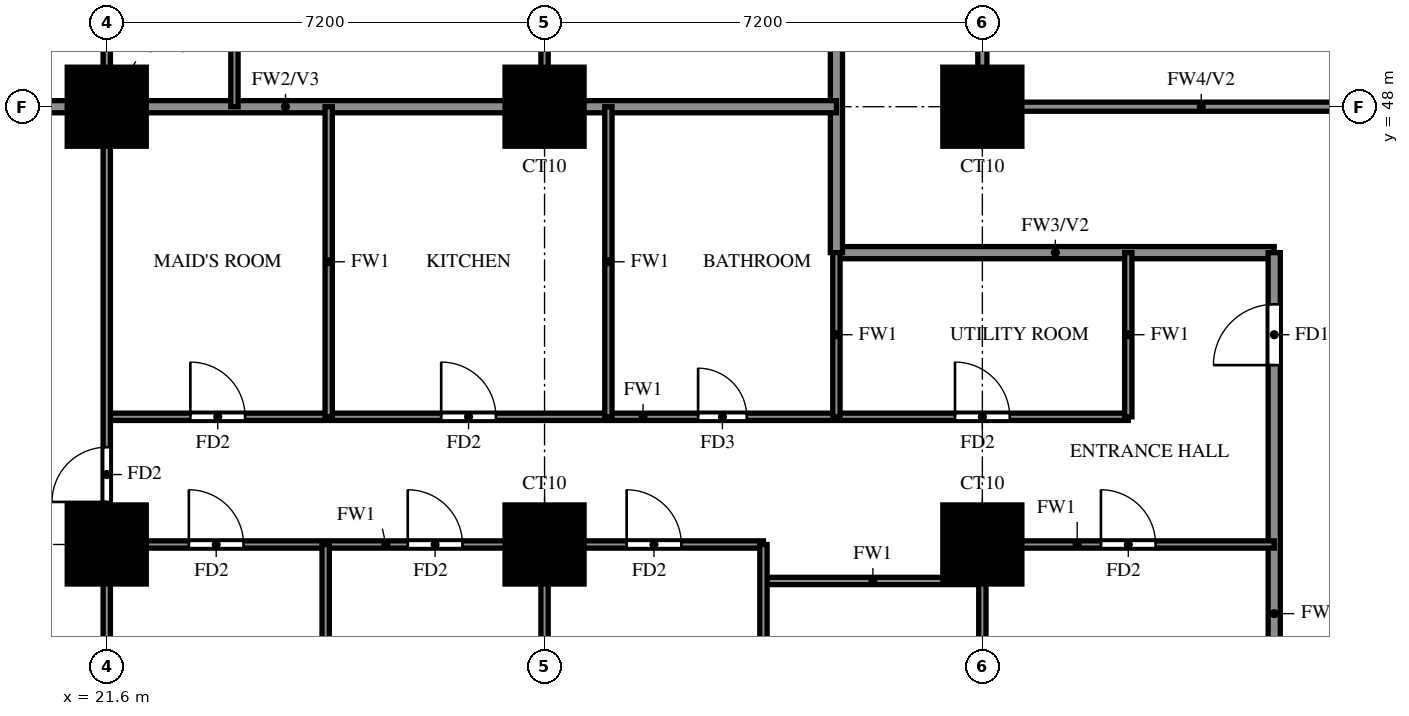
"""IFC4 building model, lengths in metres.
Left out: names, types, materials, properties, quantities, classifications, styles, units other than length and angle.
Written with IfcOpenShell. Run it as: python <this file> out.ifc"""

import sys

from ifc_helpers import new_model, si_unit, direction, frame, frame_2d, origin, origin_2d, place, context, subcontext, project, spatial, rectangle, extrude, source, transform, mapped, element, fill, save


model = new_model("IFC4")
c1 = context("Model", 3, precision=1e-05, world=origin(), true_north=direction((0.0, 1.0)))
c2 = subcontext(c1, "Body", "Model", "MODEL_VIEW")
j1 = project(units=[si_unit("LENGTHUNIT", "METRE"), si_unit("PLANEANGLEUNIT", "RADIAN")], contexts=[c1])
p1 = place(None, origin())
s1 = spatial("IfcSite", under=j1, at=p1, CompositionType="ELEMENT")
p2 = place(p1, origin())
s2 = spatial("IfcBuilding", under=s1, at=p2, CompositionType="ELEMENT")
p3 = place(p2, frame((0.0, 0.0, 62.0)))
s3 = spatial("IfcBuildingStorey", under=s2, at=p3, CompositionType="ELEMENT", Elevation=62.0)
m1 = source(origin(), c2, "Body", "SweptSolid", [
    extrude(rectangle(XDim=1.3, YDim=1.3, at=origin_2d()), origin(), (0.0, 0.0, 1.0), 3.18),
])
for number, where, z_axis, x_axis in (
    (1, (21.6, 40.8, 0.0), (0.0, 0.0, 1.0), (1.0, 0.0, 0.0)),
    (2, (28.8, 40.8, 0.0), (0.0, 0.0, 1.0), (1.0, 0.0, 0.0)),
    (3, (36.0, 40.8, 0.0), (0.0, 0.0, 1.0), (1.0, 0.0, 0.0)),
    (4, (21.6, 48.0, 0.0), (0.0, 0.0, 1.0), (1.0, 0.0, 0.0)),
    (5, (28.8, 48.0, 0.0), (0.0, 0.0, 1.0), (1.0, 0.0, 0.0)),
    (6, (36.0, 48.0, 0.0), (0.0, 0.0, 1.0), (1.0, 0.0, 0.0)),
):
    element("IfcColumn", number, at=place(p3, frame(where, z_axis=z_axis, x_axis=x_axis)), inside=s3, PredefinedType="COLUMN", context=c2, shape_type="MappedRepresentation", body=[
        mapped(m1, transform((0.0, 0.0, 0.0))),
    ])
p4 = place(p3, frame((33.6, 45.6, 0.0), z_axis=(0.0, 0.0, 1.0), x_axis=(1.0, 0.0, 0.0)))
e7 = element("IfcWall", 7, at=p4, inside=s3, PredefinedType="SOLIDWALL", context=c2, shape_type="SweptSolid", body=[
    extrude(rectangle(XDim=7.2, YDim=0.2, at=frame_2d((3.6, 0.0))), origin(), (0.0, 0.0, 1.0), 3.18),
])
p5 = place(p3, frame((33.6, 45.6, 0.0), z_axis=(0.0, 0.0, 1.0), x_axis=(0.0, 1.0, 0.0)))
e8 = element("IfcWall", 8, at=p5, inside=s3, PredefinedType="SOLIDWALL", context=c2, shape_type="SweptSolid", body=[
    extrude(rectangle(XDim=12.0, YDim=0.2, at=frame_2d((6.0, 0.0))), origin(), (0.0, 0.0, 1.0), 3.18),
])
p6 = place(p3, frame((40.8, 33.725, 0.0), z_axis=(0.0, 0.0, 1.0), x_axis=(0.0, 1.0, 0.0)))
e9 = element("IfcWall", 9, at=p6, inside=s3, PredefinedType="SOLIDWALL", context=c2, shape_type="SweptSolid", body=[
    extrude(rectangle(XDim=11.875, YDim=0.2, at=frame_2d((5.938, 0.0))), origin(), (0.0, 0.0, 1.0), 2.28),
])
p7 = place(p6, frame((10.025, 0.0, 0.0)))
e10 = element("IfcOpeningElement", 10, at=p7, cuts=e9, PredefinedType="OPENING", context=c2, shape_type="SweptSolid", body=[
    extrude(rectangle(XDim=1.0, YDim=2.1, at=frame_2d((0.5, 1.05))), frame((0.0, 0.11, 0.0), z_axis=(0.0, -1.0, 0.0), x_axis=(1.0, 0.0, 0.0)), (0.0, 0.0, 1.0), 0.22),
])
p8 = place(p3, frame((14.525, 48.0, 0.0), z_axis=(0.0, 0.0, 1.0), x_axis=(1.0, 0.0, 0.0)))
e11 = element("IfcWall", 11, at=p8, inside=s3, PredefinedType="SOLIDWALL", context=c2, shape_type="SweptSolid", body=[
    extrude(rectangle(XDim=19.075, YDim=0.2, at=frame_2d((9.538, 0.0))), origin(), (0.0, 0.0, 1.0), 3.18),
])
p9 = place(p3, frame((32.4, 40.2, 0.0), z_axis=(0.0, 0.0, 1.0), x_axis=(1.0, 0.0, 0.0)))
e12 = element("IfcWall", 12, at=p9, inside=s3, PredefinedType="PARTITIONING", context=c2, shape_type="SweptSolid", body=[
    extrude(rectangle(XDim=3.6, YDim=0.12, at=frame_2d((1.8, 0.0))), origin(), (0.0, 0.0, 1.0), 3.18),
])
p10 = place(p3, frame((21.6, 40.8, 0.0), z_axis=(0.0, 0.0, 1.0), x_axis=(1.0, 0.0, 0.0)))
e13 = element("IfcWall", 13, at=p10, inside=s3, PredefinedType="PARTITIONING", context=c2, shape_type="SweptSolid", body=[
    extrude(rectangle(XDim=10.8, YDim=0.12, at=frame_2d((5.4, 0.0))), origin(), (0.0, 0.0, 1.0), 3.18),
])
p11 = place(p10, frame((1.35, 0.0, 0.0)))
e14 = element("IfcOpeningElement", 14, at=p11, cuts=e13, PredefinedType="OPENING", context=c2, shape_type="SweptSolid", body=[
    extrude(rectangle(XDim=0.9, YDim=2.1, at=frame_2d((0.45, 1.05))), frame((0.0, 0.07, 0.0), z_axis=(0.0, -1.0, 0.0), x_axis=(1.0, 0.0, 0.0)), (0.0, 0.0, 1.0), 0.14),
])
p12 = place(p10, frame((4.95, 0.0, 0.0)))
e15 = element("IfcOpeningElement", 15, at=p12, cuts=e13, PredefinedType="OPENING", context=c2, shape_type="SweptSolid", body=[
    extrude(rectangle(XDim=0.9, YDim=2.1, at=frame_2d((0.45, 1.05))), frame((0.0, 0.07, 0.0), z_axis=(0.0, -1.0, 0.0), x_axis=(1.0, 0.0, 0.0)), (0.0, 0.0, 1.0), 0.14),
])
p13 = place(p10, frame((8.55, 0.0, 0.0)))
e16 = element("IfcOpeningElement", 16, at=p13, cuts=e13, PredefinedType="OPENING", context=c2, shape_type="SweptSolid", body=[
    extrude(rectangle(XDim=0.9, YDim=2.1, at=frame_2d((0.45, 1.05))), frame((0.0, 0.07, 0.0), z_axis=(0.0, -1.0, 0.0), x_axis=(1.0, 0.0, 0.0)), (0.0, 0.0, 1.0), 0.14),
])
p14 = place(p3, frame((36.0, 40.8, 0.0), z_axis=(0.0, 0.0, 1.0), x_axis=(1.0, 0.0, 0.0)))
e17 = element("IfcWall", 17, at=p14, inside=s3, PredefinedType="PARTITIONING", context=c2, shape_type="SweptSolid", body=[
    extrude(rectangle(XDim=4.8, YDim=0.12, at=frame_2d((2.4, 0.0))), origin(), (0.0, 0.0, 1.0), 3.18),
])
p15 = place(p14, frame((1.95, 0.0, 0.0)))
e18 = element("IfcOpeningElement", 18, at=p15, cuts=e17, PredefinedType="OPENING", context=c2, shape_type="SweptSolid", body=[
    extrude(rectangle(XDim=0.9, YDim=2.1, at=frame_2d((0.45, 1.05))), frame((0.0, 0.07, 0.0), z_axis=(0.0, -1.0, 0.0), x_axis=(1.0, 0.0, 0.0)), (0.0, 0.0, 1.0), 0.14),
])
p16 = place(p3, frame((21.6, 42.9, 0.0), z_axis=(0.0, 0.0, 1.0), x_axis=(1.0, 0.0, 0.0)))
e19 = element("IfcWall", 19, at=p16, inside=s3, PredefinedType="PARTITIONING", context=c2, shape_type="SweptSolid", body=[
    extrude(rectangle(XDim=16.8, YDim=0.12, at=frame_2d((8.4, 0.0))), origin(), (0.0, 0.0, 1.0), 3.18),
])
p17 = place(p16, frame((1.375, 0.0, 0.0)))
e20 = element("IfcOpeningElement", 20, at=p17, cuts=e19, PredefinedType="OPENING", context=c2, shape_type="SweptSolid", body=[
    extrude(rectangle(XDim=0.9, YDim=2.1, at=frame_2d((0.45, 1.05))), frame((0.0, 0.07, 0.0), z_axis=(0.0, -1.0, 0.0), x_axis=(1.0, 0.0, 0.0)), (0.0, 0.0, 1.0), 0.14),
])
p18 = place(p16, frame((5.5, 0.0, 0.0)))
e21 = element("IfcOpeningElement", 21, at=p18, cuts=e19, PredefinedType="OPENING", context=c2, shape_type="SweptSolid", body=[
    extrude(rectangle(XDim=0.9, YDim=2.1, at=frame_2d((0.45, 1.05))), frame((0.0, 0.07, 0.0), z_axis=(0.0, -1.0, 0.0), x_axis=(1.0, 0.0, 0.0)), (0.0, 0.0, 1.0), 0.14),
])
p19 = place(p16, frame((9.725, 0.0, 0.0)))
e22 = element("IfcOpeningElement", 22, at=p19, cuts=e19, PredefinedType="OPENING", context=c2, shape_type="SweptSolid", body=[
    extrude(rectangle(XDim=0.8, YDim=2.1, at=frame_2d((0.4, 1.05))), frame((0.0, 0.07, 0.0), z_axis=(0.0, -1.0, 0.0), x_axis=(1.0, 0.0, 0.0)), (0.0, 0.0, 1.0), 0.14),
])
p20 = place(p16, frame((13.95, 0.0, 0.0)))
e23 = element("IfcOpeningElement", 23, at=p20, cuts=e19, PredefinedType="OPENING", context=c2, shape_type="SweptSolid", body=[
    extrude(rectangle(XDim=0.9, YDim=2.1, at=frame_2d((0.45, 1.05))), frame((0.0, 0.07, 0.0), z_axis=(0.0, -1.0, 0.0), x_axis=(1.0, 0.0, 0.0)), (0.0, 0.0, 1.0), 0.14),
])
p21 = place(p3, frame((21.6, 33.725, 0.0), z_axis=(0.0, 0.0, 1.0), x_axis=(0.0, 1.0, 0.0)))
e24 = element("IfcWall", 24, at=p21, inside=s3, PredefinedType="PARTITIONING", context=c2, shape_type="SweptSolid", body=[
    extrude(rectangle(XDim=39.475, YDim=0.12, at=frame_2d((19.737, 0.0))), origin(), (0.0, 0.0, 1.0), 3.18),
])
p22 = place(p21, frame((7.775, 0.0, 0.0)))
e25 = element("IfcOpeningElement", 25, at=p22, cuts=e24, PredefinedType="OPENING", context=c2, shape_type="SweptSolid", body=[
    extrude(rectangle(XDim=0.9, YDim=2.1, at=frame_2d((0.45, 1.05))), frame((0.0, 0.07, 0.0), z_axis=(0.0, -1.0, 0.0), x_axis=(1.0, 0.0, 0.0)), (0.0, 0.0, 1.0), 0.14),
])
p23 = place(p21, frame((15.625, 0.0, 0.0)))
e26 = element("IfcOpeningElement", 26, at=p23, cuts=e24, PredefinedType="OPENING", context=c2, shape_type="SweptSolid", body=[
    extrude(rectangle(XDim=0.9, YDim=2.1, at=frame_2d((0.45, 1.05))), frame((0.0, 0.07, 0.0), z_axis=(0.0, -1.0, 0.0), x_axis=(1.0, 0.0, 0.0)), (0.0, 0.0, 1.0), 0.14),
])
p24 = place(p21, frame((19.225, 0.0, 0.0)))
e27 = element("IfcOpeningElement", 27, at=p24, cuts=e24, PredefinedType="OPENING", context=c2, shape_type="SweptSolid", body=[
    extrude(rectangle(XDim=0.9, YDim=2.1, at=frame_2d((0.45, 1.05))), frame((0.0, 0.07, 0.0), z_axis=(0.0, -1.0, 0.0), x_axis=(1.0, 0.0, 0.0)), (0.0, 0.0, 1.0), 0.14),
])
p25 = place(p21, frame((24.325, 0.0, 0.0)))
e28 = element("IfcOpeningElement", 28, at=p25, cuts=e24, PredefinedType="OPENING", context=c2, shape_type="SweptSolid", body=[
    extrude(rectangle(XDim=1.5, YDim=2.1, at=frame_2d((0.75, 1.05))), frame((0.0, 0.07, 0.0), z_axis=(0.0, -1.0, 0.0), x_axis=(1.0, 0.0, 0.0)), (0.0, 0.0, 1.0), 0.14),
])
p26 = place(p21, frame((30.025, 0.0, 0.0)))
e29 = element("IfcOpeningElement", 29, at=p26, cuts=e24, PredefinedType="OPENING", context=c2, shape_type="SweptSolid", body=[
    extrude(rectangle(XDim=0.9, YDim=2.1, at=frame_2d((0.45, 1.05))), frame((0.0, 0.07, 0.0), z_axis=(0.0, -1.0, 0.0), x_axis=(1.0, 0.0, 0.0)), (0.0, 0.0, 1.0), 0.14),
])
p27 = place(p21, frame((33.625, 0.0, 0.0)))
e30 = element("IfcOpeningElement", 30, at=p27, cuts=e24, PredefinedType="OPENING", context=c2, shape_type="SweptSolid", body=[
    extrude(rectangle(XDim=0.9, YDim=2.1, at=frame_2d((0.45, 1.05))), frame((0.0, 0.07, 0.0), z_axis=(0.0, -1.0, 0.0), x_axis=(1.0, 0.0, 0.0)), (0.0, 0.0, 1.0), 0.14),
])
p28 = place(p21, frame((37.225, 0.0, 0.0)))
e31 = element("IfcOpeningElement", 31, at=p28, cuts=e24, PredefinedType="OPENING", context=c2, shape_type="SweptSolid", body=[
    extrude(rectangle(XDim=0.9, YDim=2.1, at=frame_2d((0.45, 1.05))), frame((0.0, 0.07, 0.0), z_axis=(0.0, -1.0, 0.0), x_axis=(1.0, 0.0, 0.0)), (0.0, 0.0, 1.0), 0.14),
])
p29 = place(p3, frame((23.7, 48.0, 0.0), z_axis=(0.0, 0.0, 1.0), x_axis=(0.0, 1.0, 0.0)))
e32 = element("IfcWall", 32, at=p29, inside=s3, PredefinedType="PARTITIONING", context=c2, shape_type="SweptSolid", body=[
    extrude(rectangle(XDim=7.2, YDim=0.12, at=frame_2d((3.6, 0.0))), origin(), (0.0, 0.0, 1.0), 3.18),
])
p30 = place(p29, frame((1.925, 0.0, 0.0)))
e33 = element("IfcOpeningElement", 33, at=p30, cuts=e32, PredefinedType="OPENING", context=c2, shape_type="SweptSolid", body=[
    extrude(rectangle(XDim=0.9, YDim=2.1, at=frame_2d((0.45, 1.05))), frame((0.0, 0.07, 0.0), z_axis=(0.0, -1.0, 0.0), x_axis=(1.0, 0.0, 0.0)), (0.0, 0.0, 1.0), 0.14),
])
p31 = place(p3, frame((25.2, 33.725, 0.0), z_axis=(0.0, 0.0, 1.0), x_axis=(0.0, 1.0, 0.0)))
e34 = element("IfcWall", 34, at=p31, inside=s3, PredefinedType="PARTITIONING", context=c2, shape_type="SweptSolid", body=[
    extrude(rectangle(XDim=7.075, YDim=0.12, at=frame_2d((3.538, 0.0))), origin(), (0.0, 0.0, 1.0), 2.28),
])
p32 = place(p3, frame((25.25, 42.9, 0.0), z_axis=(0.0, 0.0, 1.0), x_axis=(0.0, 1.0, 0.0)))
e35 = element("IfcWall", 35, at=p32, inside=s3, PredefinedType="PARTITIONING", context=c2, shape_type="SweptSolid", body=[
    extrude(rectangle(XDim=5.1, YDim=0.12, at=frame_2d((2.55, 0.0))), origin(), (0.0, 0.0, 1.0), 3.18),
])
p33 = place(p3, frame((28.8, 33.725, 0.0), z_axis=(0.0, 0.0, 1.0), x_axis=(0.0, 1.0, 0.0)))
e36 = element("IfcWall", 36, at=p33, inside=s3, PredefinedType="PARTITIONING", context=c2, shape_type="SweptSolid", body=[
    extrude(rectangle(XDim=7.075, YDim=0.12, at=frame_2d((3.538, 0.0))), origin(), (0.0, 0.0, 1.0), 3.18),
])
p34 = place(p3, frame((28.8, 48.0, 0.0), z_axis=(0.0, 0.0, 1.0), x_axis=(0.0, 1.0, 0.0)))
e37 = element("IfcWall", 37, at=p34, inside=s3, PredefinedType="PARTITIONING", context=c2, shape_type="SweptSolid", body=[
    extrude(rectangle(XDim=7.2, YDim=0.12, at=frame_2d((3.6, 0.0))), origin(), (0.0, 0.0, 1.0), 3.18),
])
p35 = place(p3, frame((29.85, 42.9, 0.0), z_axis=(0.0, 0.0, 1.0), x_axis=(0.0, 1.0, 0.0)))
e38 = element("IfcWall", 38, at=p35, inside=s3, PredefinedType="PARTITIONING", context=c2, shape_type="SweptSolid", body=[
    extrude(rectangle(XDim=5.1, YDim=0.12, at=frame_2d((2.55, 0.0))), origin(), (0.0, 0.0, 1.0), 3.18),
])
p36 = place(p3, frame((32.4, 33.725, 0.0), z_axis=(0.0, 0.0, 1.0), x_axis=(0.0, 1.0, 0.0)))
e39 = element("IfcWall", 39, at=p36, inside=s3, PredefinedType="PARTITIONING", context=c2, shape_type="SweptSolid", body=[
    extrude(rectangle(XDim=7.075, YDim=0.12, at=frame_2d((3.538, 0.0))), origin(), (0.0, 0.0, 1.0), 2.28),
])
p37 = place(p36, frame((2.837, 0.0, 0.0)))
e40 = element("IfcOpeningElement", 40, at=p37, cuts=e39, PredefinedType="OPENING", context=c2, shape_type="SweptSolid", body=[
    extrude(rectangle(XDim=0.8, YDim=2.1, at=frame_2d((0.4, 1.05))), frame((0.0, 0.07, 0.0), z_axis=(0.0, -1.0, 0.0), x_axis=(1.0, 0.0, 0.0)), (0.0, 0.0, 1.0), 0.14),
])
p38 = place(p3, frame((33.6, 42.9, 0.0), z_axis=(0.0, 0.0, 1.0), x_axis=(0.0, 1.0, 0.0)))
e41 = element("IfcWall", 41, at=p38, inside=s3, PredefinedType="PARTITIONING", context=c2, shape_type="SweptSolid", body=[
    extrude(rectangle(XDim=2.7, YDim=0.12, at=frame_2d((1.35, 0.0))), origin(), (0.0, 0.0, 1.0), 3.18),
])
p39 = place(p3, frame((36.0, 33.725, 0.0), z_axis=(0.0, 0.0, 1.0), x_axis=(0.0, 1.0, 0.0)))
e42 = element("IfcWall", 42, at=p39, inside=s3, PredefinedType="PARTITIONING", context=c2, shape_type="SweptSolid", body=[
    extrude(rectangle(XDim=7.075, YDim=0.12, at=frame_2d((3.538, 0.0))), origin(), (0.0, 0.0, 1.0), 3.18),
])
p40 = place(p3, frame((38.4, 42.9, 0.0), z_axis=(0.0, 0.0, 1.0), x_axis=(0.0, 1.0, 0.0)))
e43 = element("IfcWall", 43, at=p40, inside=s3, PredefinedType="PARTITIONING", context=c2, shape_type="SweptSolid", body=[
    extrude(rectangle(XDim=2.7, YDim=0.12, at=frame_2d((1.35, 0.0))), origin(), (0.0, 0.0, 1.0), 3.18),
])
p41 = place(p3, frame((36.0, 48.0, 0.0), z_axis=(0.0, 0.0, 1.0), x_axis=(1.0, 0.0, 0.0)))
e44 = element("IfcWall", 44, at=p41, inside=s3, PredefinedType="SOLIDWALL", context=c2, shape_type="SweptSolid", body=[
    extrude(rectangle(XDim=7.2, YDim=0.15, at=frame_2d((3.6, 0.0))), origin(), (0.0, 0.0, 1.0), 2.28),
])
p42 = place(p3, frame((36.0, 48.0, 0.0), z_axis=(0.0, 0.0, 1.0), x_axis=(0.0, 1.0, 0.0)))
e45 = element("IfcWall", 45, at=p42, inside=s3, PredefinedType="SOLIDWALL", context=c2, shape_type="SweptSolid", body=[
    extrude(rectangle(XDim=14.4, YDim=0.15, at=frame_2d((7.2, 0.0))), origin(), (0.0, 0.0, 1.0), 2.28),
])
p43 = place(p7, origin())
e46 = element("IfcDoor", 46, at=p43, inside=s3, OperationType="SINGLE_SWING_RIGHT", PredefinedType="DOOR", context=c2, shape_type="SweptSolid", body=[
    extrude(rectangle(XDim=1.0, YDim=2.1, at=frame_2d((0.5, 1.05))), frame((0.0, 0.025, 0.0), z_axis=(0.0, -1.0, 0.0), x_axis=(1.0, 0.0, 0.0)), (0.0, 0.0, 1.0), 0.05),
])
fill(e10, e46)
p44 = place(p22, origin())
e47 = element("IfcDoor", 47, at=p44, inside=s3, OperationType="SINGLE_SWING_RIGHT", PredefinedType="DOOR", context=c2, shape_type="SweptSolid", body=[
    extrude(rectangle(XDim=0.9, YDim=2.1, at=frame_2d((0.45, 1.05))), frame((0.0, 0.025, 0.0), z_axis=(0.0, -1.0, 0.0), x_axis=(1.0, 0.0, 0.0)), (0.0, 0.0, 1.0), 0.05),
])
fill(e25, e47)
p45 = place(p11, origin())
e48 = element("IfcDoor", 48, at=p45, inside=s3, OperationType="SINGLE_SWING_LEFT", PredefinedType="DOOR", context=c2, shape_type="SweptSolid", body=[
    extrude(rectangle(XDim=0.9, YDim=2.1, at=frame_2d((0.45, 1.05))), frame((0.0, 0.025, 0.0), z_axis=(0.0, -1.0, 0.0), x_axis=(1.0, 0.0, 0.0)), (0.0, 0.0, 1.0), 0.05),
])
fill(e14, e48)
p46 = place(p12, origin())
e49 = element("IfcDoor", 49, at=p46, inside=s3, OperationType="SINGLE_SWING_RIGHT", PredefinedType="DOOR", context=c2, shape_type="SweptSolid", body=[
    extrude(rectangle(XDim=0.9, YDim=2.1, at=frame_2d((0.45, 1.05))), frame((0.0, 0.025, 0.0), z_axis=(0.0, -1.0, 0.0), x_axis=(1.0, 0.0, 0.0)), (0.0, 0.0, 1.0), 0.05),
])
fill(e15, e49)
p47 = place(p13, origin())
e50 = element("IfcDoor", 50, at=p47, inside=s3, OperationType="SINGLE_SWING_LEFT", PredefinedType="DOOR", context=c2, shape_type="SweptSolid", body=[
    extrude(rectangle(XDim=0.9, YDim=2.1, at=frame_2d((0.45, 1.05))), frame((0.0, 0.025, 0.0), z_axis=(0.0, -1.0, 0.0), x_axis=(1.0, 0.0, 0.0)), (0.0, 0.0, 1.0), 0.05),
])
fill(e16, e50)
p48 = place(p15, origin())
e51 = element("IfcDoor", 51, at=p48, inside=s3, OperationType="SINGLE_SWING_RIGHT", PredefinedType="DOOR", context=c2, shape_type="SweptSolid", body=[
    extrude(rectangle(XDim=0.9, YDim=2.1, at=frame_2d((0.45, 1.05))), frame((0.0, 0.025, 0.0), z_axis=(0.0, -1.0, 0.0), x_axis=(1.0, 0.0, 0.0)), (0.0, 0.0, 1.0), 0.05),
])
fill(e18, e51)
p49 = place(p17, origin())
e52 = element("IfcDoor", 52, at=p49, inside=s3, OperationType="SINGLE_SWING_LEFT", PredefinedType="DOOR", context=c2, shape_type="SweptSolid", body=[
    extrude(rectangle(XDim=0.9, YDim=2.1, at=frame_2d((0.45, 1.05))), frame((0.0, 0.025, 0.0), z_axis=(0.0, -1.0, 0.0), x_axis=(1.0, 0.0, 0.0)), (0.0, 0.0, 1.0), 0.05),
])
fill(e20, e52)
p50 = place(p18, origin())
e53 = element("IfcDoor", 53, at=p50, inside=s3, OperationType="SINGLE_SWING_LEFT", PredefinedType="DOOR", context=c2, shape_type="SweptSolid", body=[
    extrude(rectangle(XDim=0.9, YDim=2.1, at=frame_2d((0.45, 1.05))), frame((0.0, 0.025, 0.0), z_axis=(0.0, -1.0, 0.0), x_axis=(1.0, 0.0, 0.0)), (0.0, 0.0, 1.0), 0.05),
])
fill(e21, e53)
p51 = place(p19, origin())
e54 = element("IfcDoor", 54, at=p51, inside=s3, OperationType="SINGLE_SWING_RIGHT", PredefinedType="DOOR", context=c2, shape_type="SweptSolid", body=[
    extrude(rectangle(XDim=0.8, YDim=2.1, at=frame_2d((0.4, 1.05))), frame((0.0, 0.025, 0.0), z_axis=(0.0, -1.0, 0.0), x_axis=(1.0, 0.0, 0.0)), (0.0, 0.0, 1.0), 0.05),
])
fill(e22, e54)
p52 = place(p20, origin())
e55 = element("IfcDoor", 55, at=p52, inside=s3, OperationType="SINGLE_SWING_LEFT", PredefinedType="DOOR", context=c2, shape_type="SweptSolid", body=[
    extrude(rectangle(XDim=0.9, YDim=2.1, at=frame_2d((0.45, 1.05))), frame((0.0, 0.025, 0.0), z_axis=(0.0, -1.0, 0.0), x_axis=(1.0, 0.0, 0.0)), (0.0, 0.0, 1.0), 0.05),
])
fill(e23, e55)
save(model, sys.argv[1])
